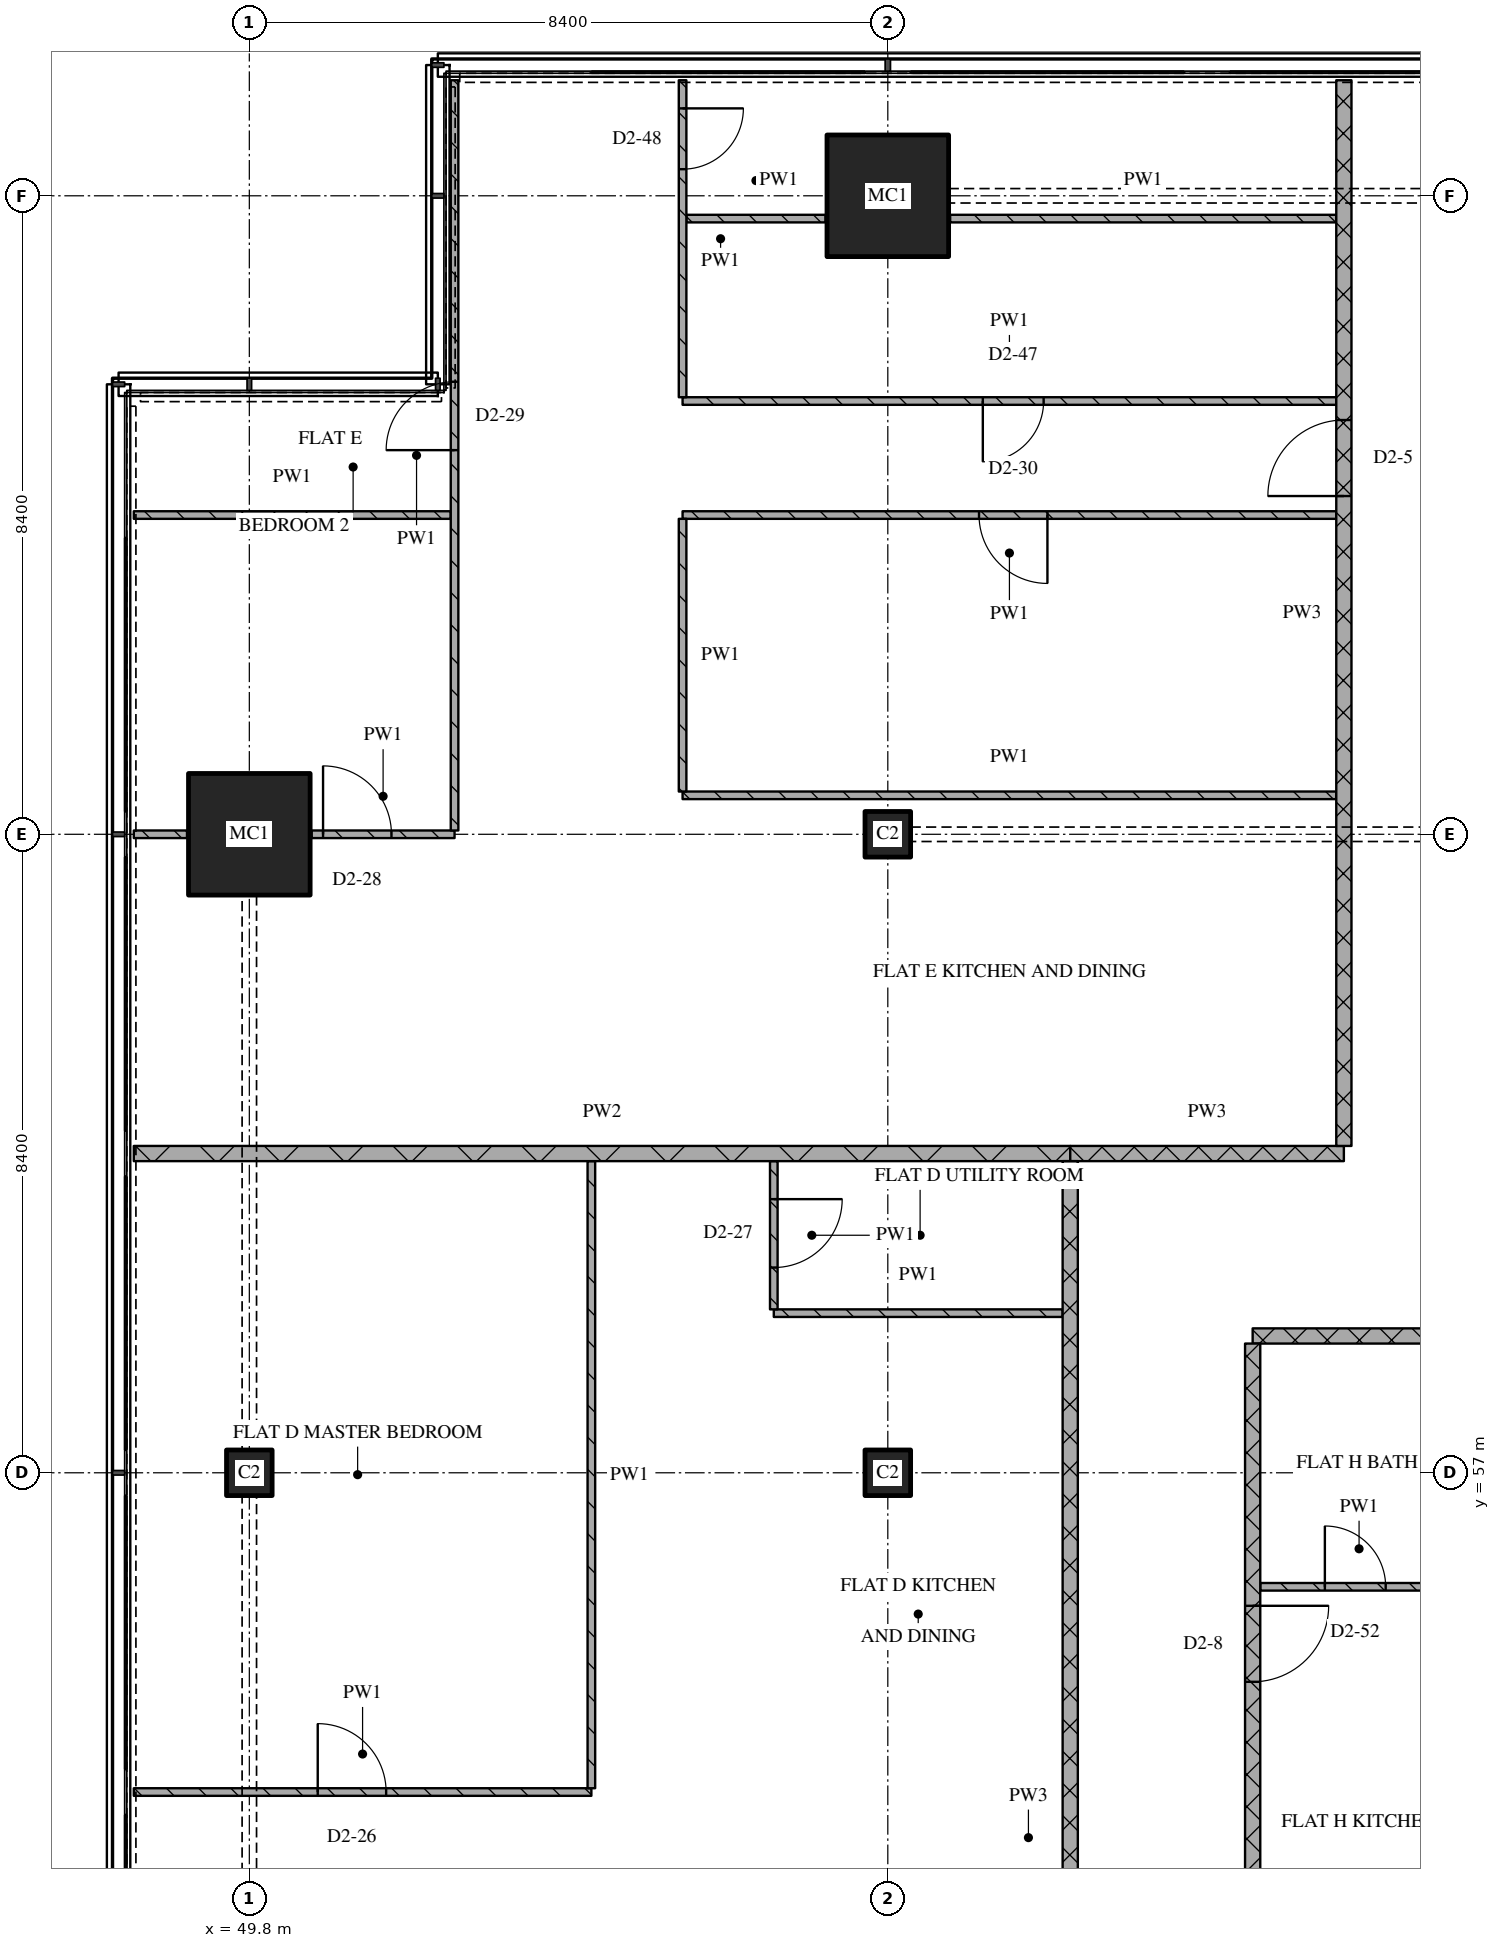
"""IFC4 building model, lengths in metres.
Left out: names, types, materials, properties, quantities, classifications, styles, units other than length and angle.
Written with IfcOpenShell. Run it as: python <this file> out.ifc"""

import sys

from ifc_helpers import new_model, si_unit, direction, frame, frame_2d, origin, origin_2d, place, context, subcontext, project, spatial, rectangle, extrude, element, fill, save


model = new_model("IFC4")
c1 = context("Model", 3, precision=1e-05, world=origin(), true_north=direction((0.0, 1.0)))
c2 = subcontext(c1, "Body", "Model", "MODEL_VIEW")
j1 = project(units=[si_unit("LENGTHUNIT", "METRE"), si_unit("PLANEANGLEUNIT", "RADIAN")], contexts=[c1])
p1 = place(None, origin())
s1 = spatial("IfcSite", under=j1, at=p1, CompositionType="ELEMENT")
p2 = place(p1, origin())
s2 = spatial("IfcBuilding", under=s1, at=p2, CompositionType="ELEMENT")
p3 = place(p2, frame((0.0, 0.0, 219.9)))
s3 = spatial("IfcBuildingStorey", under=s2, at=p3, CompositionType="ELEMENT", Elevation=219.9)
p4 = place(p3, frame((49.8, 57.0, 0.0), z_axis=(0.0, 0.0, 1.0), x_axis=(1.0, 0.0, 0.0)))
e1 = element("IfcColumn", 1, at=p4, inside=s3, PredefinedType="COLUMN", context=c2, shape_type="SweptSolid", body=[
    extrude(rectangle(XDim=0.6, YDim=0.6, at=origin_2d()), origin(), (0.0, 0.0, 1.0), 3.6),
])
p5 = place(p3, frame((49.8, 65.4, 0.0), z_axis=(0.0, 0.0, 1.0), x_axis=(1.0, 0.0, 0.0)))
e2 = element("IfcColumn", 2, at=p5, inside=s3, PredefinedType="COLUMN", context=c2, shape_type="SweptSolid", body=[
    extrude(rectangle(XDim=1.6, YDim=1.6, at=origin_2d()), origin(), (0.0, 0.0, 1.0), 3.6),
])
for number, where, z_axis, x_axis in (
    (3, (58.2, 57.0, 0.0), (0.0, 0.0, 1.0), (1.0, 0.0, 0.0)),
    (4, (58.2, 65.4, 0.0), (0.0, 0.0, 1.0), (1.0, 0.0, 0.0)),
):
    element("IfcColumn", number, at=place(p3, frame(where, z_axis=z_axis, x_axis=x_axis)), inside=s3, PredefinedType="COLUMN", context=c2, shape_type="SweptSolid", body=[
        extrude(rectangle(XDim=0.6, YDim=0.6, at=origin_2d()), origin(), (0.0, 0.0, 1.0), 3.6),
    ])
p6 = place(p3, frame((58.2, 73.8, 0.0), z_axis=(0.0, 0.0, 1.0), x_axis=(1.0, 0.0, 0.0)))
e5 = element("IfcColumn", 5, at=p6, inside=s3, PredefinedType="COLUMN", context=c2, shape_type="SweptSolid", body=[
    extrude(rectangle(XDim=1.6, YDim=1.6, at=origin_2d()), origin(), (0.0, 0.0, 1.0), 3.6),
])
p7 = place(p3, frame((48.28, 52.8, 0.0), z_axis=(0.0, 0.0, 1.0), x_axis=(1.0, 0.0, 0.0)))
e6 = element("IfcWall", 6, at=p7, inside=s3, PredefinedType="PARTITIONING", context=c2, shape_type="SweptSolid", body=[
    extrude(rectangle(XDim=6.02, YDim=0.1, at=frame_2d((3.01, 0.0))), origin(), (0.0, 0.0, 1.0), 3.32),
])
p8 = place(p7, frame((2.42, 0.0, 0.0)))
e7 = element("IfcOpeningElement", 7, at=p8, cuts=e6, PredefinedType="OPENING", context=c2, shape_type="SweptSolid", body=[
    extrude(rectangle(XDim=0.9, YDim=2.1, at=frame_2d((0.45, 1.05))), frame((0.0, 0.06, 0.0), z_axis=(0.0, -1.0, 0.0), x_axis=(1.0, 0.0, 0.0)), (0.0, 0.0, 1.0), 0.12),
])
p9 = place(p3, frame((63.1, 55.5, 0.0), z_axis=(0.0, 0.0, 1.0), x_axis=(1.0, 0.0, 0.0)))
e8 = element("IfcWall", 8, at=p9, inside=s3, PredefinedType="PARTITIONING", context=c2, shape_type="SweptSolid", body=[
    extrude(rectangle(XDim=2.6, YDim=0.1, at=frame_2d((1.3, 0.0))), origin(), (0.0, 0.0, 1.0), 3.32),
])
p10 = place(p9, frame((0.85, 0.0, 0.0)))
e9 = element("IfcOpeningElement", 9, at=p10, cuts=e8, PredefinedType="OPENING", context=c2, shape_type="SweptSolid", body=[
    extrude(rectangle(XDim=0.8, YDim=2.1, at=frame_2d((0.4, 1.05))), frame((0.0, 0.06, 0.0), z_axis=(0.0, -1.0, 0.0), x_axis=(1.0, 0.0, 0.0)), (0.0, 0.0, 1.0), 0.12),
])
p11 = place(p3, frame((63.0, 58.8, 0.0), z_axis=(0.0, 0.0, 1.0), x_axis=(1.0, 0.0, 0.0)))
e10 = element("IfcWall", 10, at=p11, inside=s3, PredefinedType="PARTITIONING", context=c2, shape_type="SweptSolid", body=[
    extrude(rectangle(XDim=10.8, YDim=0.2, at=frame_2d((5.4, 0.0))), origin(), (0.0, 0.0, 1.0), 3.32),
])
p12 = place(p3, frame((56.7, 59.1, 0.0), z_axis=(0.0, 0.0, 1.0), x_axis=(1.0, 0.0, 0.0)))
e11 = element("IfcWall", 11, at=p12, inside=s3, PredefinedType="PARTITIONING", context=c2, shape_type="SweptSolid", body=[
    extrude(rectangle(XDim=3.8, YDim=0.1, at=frame_2d((1.9, 0.0))), origin(), (0.0, 0.0, 1.0), 3.32),
])
p13 = place(p3, frame((60.6, 61.2, 0.0), z_axis=(0.0, 0.0, 1.0), x_axis=(1.0, 0.0, 0.0)))
e12 = element("IfcWall", 12, at=p13, inside=s3, PredefinedType="PARTITIONING", context=c2, shape_type="SweptSolid", body=[
    extrude(rectangle(XDim=3.6, YDim=0.2, at=frame_2d((1.8, 0.0))), origin(), (0.0, 0.0, 1.0), 3.32),
])
p14 = place(p3, frame((48.28, 61.2, 0.0), z_axis=(0.0, 0.0, 1.0), x_axis=(1.0, 0.0, 0.0)))
e13 = element("IfcWall", 13, at=p14, inside=s3, PredefinedType="PARTITIONING", context=c2, shape_type="SweptSolid", body=[
    extrude(rectangle(XDim=12.32, YDim=0.2, at=frame_2d((6.16, 0.0))), origin(), (0.0, 0.0, 1.0), 3.32),
])
p15 = place(p3, frame((48.28, 65.4, 0.0), z_axis=(0.0, 0.0, 1.0), x_axis=(1.0, 0.0, 0.0)))
e14 = element("IfcWall", 14, at=p15, inside=s3, PredefinedType="PARTITIONING", context=c2, shape_type="SweptSolid", body=[
    extrude(rectangle(XDim=0.7, YDim=0.1, at=frame_2d((0.35, 0.0))), origin(), (0.0, 0.0, 1.0), 3.32),
])
p16 = place(p3, frame((50.62, 65.4, 0.0), z_axis=(0.0, 0.0, 1.0), x_axis=(1.0, 0.0, 0.0)))
e15 = element("IfcWall", 15, at=p16, inside=s3, PredefinedType="PARTITIONING", context=c2, shape_type="SweptSolid", body=[
    extrude(rectangle(XDim=1.88, YDim=0.1, at=frame_2d((0.94, 0.0))), origin(), (0.0, 0.0, 1.0), 3.32),
])
p17 = place(p16, frame((0.15, 0.0, 0.0)))
e16 = element("IfcOpeningElement", 16, at=p17, cuts=e15, PredefinedType="OPENING", context=c2, shape_type="SweptSolid", body=[
    extrude(rectangle(XDim=0.9, YDim=2.1, at=frame_2d((0.45, 1.05))), frame((0.0, 0.06, 0.0), z_axis=(0.0, -1.0, 0.0), x_axis=(1.0, 0.0, 0.0)), (0.0, 0.0, 1.0), 0.12),
])
p18 = place(p3, frame((55.5, 65.913, 0.0), z_axis=(0.0, 0.0, 1.0), x_axis=(1.0, 0.0, 0.0)))
e17 = element("IfcWall", 17, at=p18, inside=s3, PredefinedType="PARTITIONING", context=c2, shape_type="SweptSolid", body=[
    extrude(rectangle(XDim=8.6, YDim=0.1, at=frame_2d((4.3, 0.0))), origin(), (0.0, 0.0, 1.0), 3.32),
])
p19 = place(p3, frame((48.28, 69.6, 0.0), z_axis=(0.0, 0.0, 1.0), x_axis=(1.0, 0.0, 0.0)))
e18 = element("IfcWall", 18, at=p19, inside=s3, PredefinedType="PARTITIONING", context=c2, shape_type="SweptSolid", body=[
    extrude(rectangle(XDim=4.17, YDim=0.1, at=frame_2d((2.085, 0.0))), origin(), (0.0, 0.0, 1.0), 3.32),
])
p20 = place(p3, frame((64.1, 69.6, 0.0), z_axis=(0.0, 0.0, 1.0), x_axis=(-1.0, 0.0, 0.0)))
e19 = element("IfcWall", 19, at=p20, inside=s3, PredefinedType="PARTITIONING", context=c2, shape_type="SweptSolid", body=[
    extrude(rectangle(XDim=8.6, YDim=0.1, at=frame_2d((4.3, 0.0))), origin(), (0.0, 0.0, 1.0), 3.32),
])
p21 = place(p20, frame((3.8, 0.0, 0.0)))
e20 = element("IfcOpeningElement", 20, at=p21, cuts=e19, PredefinedType="OPENING", context=c2, shape_type="SweptSolid", body=[
    extrude(rectangle(XDim=0.9, YDim=2.1, at=frame_2d((0.45, 1.05))), frame((0.0, 0.06, 0.0), z_axis=(0.0, -1.0, 0.0), x_axis=(1.0, 0.0, 0.0)), (0.0, 0.0, 1.0), 0.12),
])
p22 = place(p3, frame((55.5, 71.1, 0.0), z_axis=(0.0, 0.0, 1.0), x_axis=(1.0, 0.0, 0.0)))
e21 = element("IfcWall", 21, at=p22, inside=s3, PredefinedType="PARTITIONING", context=c2, shape_type="SweptSolid", body=[
    extrude(rectangle(XDim=8.6, YDim=0.1, at=frame_2d((4.3, 0.0))), origin(), (0.0, 0.0, 1.0), 3.32),
])
p23 = place(p22, frame((3.95, 0.0, 0.0)))
e22 = element("IfcOpeningElement", 22, at=p23, cuts=e21, PredefinedType="OPENING", context=c2, shape_type="SweptSolid", body=[
    extrude(rectangle(XDim=0.8, YDim=2.1, at=frame_2d((0.4, 1.05))), frame((0.0, 0.06, 0.0), z_axis=(0.0, -1.0, 0.0), x_axis=(1.0, 0.0, 0.0)), (0.0, 0.0, 1.0), 0.12),
])
p24 = place(p3, frame((55.55, 73.5, 0.0), z_axis=(0.0, 0.0, 1.0), x_axis=(1.0, 0.0, 0.0)))
e23 = element("IfcWall", 23, at=p24, inside=s3, PredefinedType="PARTITIONING", context=c2, shape_type="SweptSolid", body=[
    extrude(rectangle(XDim=1.83, YDim=0.1, at=frame_2d((0.915, 0.0))), origin(), (0.0, 0.0, 1.0), 3.32),
])
p25 = place(p3, frame((59.02, 73.5, 0.0), z_axis=(0.0, 0.0, 1.0), x_axis=(1.0, 0.0, 0.0)))
e24 = element("IfcWall", 24, at=p25, inside=s3, PredefinedType="PARTITIONING", context=c2, shape_type="SweptSolid", body=[
    extrude(rectangle(XDim=5.08, YDim=0.1, at=frame_2d((2.54, 0.0))), origin(), (0.0, 0.0, 1.0), 3.32),
])
p26 = place(p3, frame((52.5, 65.45, 0.0), z_axis=(0.0, 0.0, 1.0), x_axis=(0.0, 1.0, 0.0)))
e25 = element("IfcWall", 25, at=p26, inside=s3, PredefinedType="PARTITIONING", context=c2, shape_type="SweptSolid", body=[
    extrude(rectangle(XDim=9.87, YDim=0.1, at=frame_2d((4.935, 0.0))), origin(), (0.0, 0.0, 1.0), 3.32),
])
p27 = place(p26, frame((5.004, 0.0, 0.0)))
e26 = element("IfcOpeningElement", 26, at=p27, cuts=e25, PredefinedType="OPENING", context=c2, shape_type="SweptSolid", body=[
    extrude(rectangle(XDim=0.9, YDim=2.1, at=frame_2d((0.45, 1.05))), frame((0.0, 0.06, 0.0), z_axis=(0.0, -1.0, 0.0), x_axis=(1.0, 0.0, 0.0)), (0.0, 0.0, 1.0), 0.12),
])
p28 = place(p3, frame((54.3, 61.1, 0.0), z_axis=(0.0, 0.0, 1.0), x_axis=(0.0, -1.0, 0.0)))
e27 = element("IfcWall", 27, at=p28, inside=s3, PredefinedType="PARTITIONING", context=c2, shape_type="SweptSolid", body=[
    extrude(rectangle(XDim=8.25, YDim=0.1, at=frame_2d((4.125, 0.0))), origin(), (0.0, 0.0, 1.0), 3.32),
])
p29 = place(p3, frame((55.5, 69.55, 0.0), z_axis=(0.0, 0.0, 1.0), x_axis=(0.0, -1.0, 0.0)))
e28 = element("IfcWall", 28, at=p29, inside=s3, PredefinedType="PARTITIONING", context=c2, shape_type="SweptSolid", body=[
    extrude(rectangle(XDim=3.587, YDim=0.1, at=frame_2d((1.794, 0.0))), origin(), (0.0, 0.0, 1.0), 3.32),
])
p30 = place(p3, frame((55.5, 75.32, 0.0), z_axis=(0.0, 0.0, 1.0), x_axis=(0.0, -1.0, 0.0)))
e29 = element("IfcWall", 29, at=p30, inside=s3, PredefinedType="PARTITIONING", context=c2, shape_type="SweptSolid", body=[
    extrude(rectangle(XDim=4.17, YDim=0.1, at=frame_2d((2.085, 0.0))), origin(), (0.0, 0.0, 1.0), 3.32),
])
p31 = place(p30, frame((0.37, 0.0, 0.0)))
e30 = element("IfcOpeningElement", 30, at=p31, cuts=e29, PredefinedType="OPENING", context=c2, shape_type="SweptSolid", body=[
    extrude(rectangle(XDim=0.8, YDim=2.1, at=frame_2d((0.4, 1.05))), frame((0.0, 0.06, 0.0), z_axis=(0.0, -1.0, 0.0), x_axis=(1.0, 0.0, 0.0)), (0.0, 0.0, 1.0), 0.12),
])
p32 = place(p3, frame((56.7, 61.1, 0.0), z_axis=(0.0, 0.0, 1.0), x_axis=(0.0, -1.0, 0.0)))
e31 = element("IfcWall", 31, at=p32, inside=s3, PredefinedType="PARTITIONING", context=c2, shape_type="SweptSolid", body=[
    extrude(rectangle(XDim=1.95, YDim=0.1, at=frame_2d((0.975, 0.0))), origin(), (0.0, 0.0, 1.0), 3.32),
])
p33 = place(p32, frame((0.5, 0.0, 0.0)))
e32 = element("IfcOpeningElement", 32, at=p33, cuts=e31, PredefinedType="OPENING", context=c2, shape_type="SweptSolid", body=[
    extrude(rectangle(XDim=0.9, YDim=2.1, at=frame_2d((0.45, 1.05))), frame((0.0, 0.06, 0.0), z_axis=(0.0, -1.0, 0.0), x_axis=(1.0, 0.0, 0.0)), (0.0, 0.0, 1.0), 0.12),
])
p34 = place(p3, frame((60.6, 43.3, 0.0), z_axis=(0.0, 0.0, 1.0), x_axis=(0.0, 1.0, 0.0)))
e33 = element("IfcWall", 33, at=p34, inside=s3, PredefinedType="PARTITIONING", context=c2, shape_type="SweptSolid", body=[
    extrude(rectangle(XDim=17.8, YDim=0.2, at=frame_2d((8.9, 0.0))), origin(), (0.0, 0.0, 1.0), 3.32),
])
p35 = place(p34, frame((7.05, 0.0, 0.0)))
e34 = element("IfcOpeningElement", 34, at=p35, cuts=e33, PredefinedType="OPENING", context=c2, shape_type="SweptSolid", body=[
    extrude(rectangle(XDim=1.0, YDim=2.1, at=frame_2d((0.5, 1.05))), frame((0.0, 0.11, 0.0), z_axis=(0.0, -1.0, 0.0), x_axis=(1.0, 0.0, 0.0)), (0.0, 0.0, 1.0), 0.22),
])
p36 = place(p3, frame((63.0, 58.7, 0.0), z_axis=(0.0, 0.0, 1.0), x_axis=(0.0, -1.0, 0.0)))
e35 = element("IfcWall", 35, at=p36, inside=s3, PredefinedType="PARTITIONING", context=c2, shape_type="SweptSolid", body=[
    extrude(rectangle(XDim=15.4, YDim=0.2, at=frame_2d((7.7, 0.0))), origin(), (0.0, 0.0, 1.0), 3.32),
])
p37 = place(p36, frame((3.45, 0.0, 0.0)))
e36 = element("IfcOpeningElement", 36, at=p37, cuts=e35, PredefinedType="OPENING", context=c2, shape_type="SweptSolid", body=[
    extrude(rectangle(XDim=1.0, YDim=2.1, at=frame_2d((0.5, 1.05))), frame((0.0, 0.11, 0.0), z_axis=(0.0, -1.0, 0.0), x_axis=(1.0, 0.0, 0.0)), (0.0, 0.0, 1.0), 0.22),
])
p38 = place(p36, frame((11.25, 0.0, 0.0)))
e37 = element("IfcOpeningElement", 37, at=p38, cuts=e35, PredefinedType="OPENING", context=c2, shape_type="SweptSolid", body=[
    extrude(rectangle(XDim=0.9, YDim=2.1, at=frame_2d((0.45, 1.05))), frame((0.0, 0.11, 0.0), z_axis=(0.0, -1.0, 0.0), x_axis=(1.0, 0.0, 0.0)), (0.0, 0.0, 1.0), 0.22),
])
p39 = place(p3, frame((64.2, 61.3, 0.0), z_axis=(0.0, 0.0, 1.0), x_axis=(0.0, 1.0, 0.0)))
e38 = element("IfcWall", 38, at=p39, inside=s3, PredefinedType="PARTITIONING", context=c2, shape_type="SweptSolid", body=[
    extrude(rectangle(XDim=14.02, YDim=0.2, at=frame_2d((7.01, 0.0))), origin(), (0.0, 0.0, 1.0), 3.32),
])
p40 = place(p39, frame((8.55, 0.0, 0.0)))
e39 = element("IfcOpeningElement", 39, at=p40, cuts=e38, PredefinedType="OPENING", context=c2, shape_type="SweptSolid", body=[
    extrude(rectangle(XDim=1.0, YDim=2.1, at=frame_2d((0.5, 1.05))), frame((0.0, 0.11, 0.0), z_axis=(0.0, -1.0, 0.0), x_axis=(1.0, 0.0, 0.0)), (0.0, 0.0, 1.0), 0.22),
])
p41 = place(p8, origin())
e40 = element("IfcDoor", 40, at=p41, inside=s3, OperationType="SINGLE_SWING_LEFT", PredefinedType="DOOR", context=c2, shape_type="SweptSolid", body=[
    extrude(rectangle(XDim=0.9, YDim=2.1, at=frame_2d((0.45, 1.05))), frame((0.0, 0.025, 0.0), z_axis=(0.0, -1.0, 0.0), x_axis=(1.0, 0.0, 0.0)), (0.0, 0.0, 1.0), 0.05),
])
fill(e7, e40)
p42 = place(p10, origin())
e41 = element("IfcDoor", 41, at=p42, inside=s3, OperationType="SINGLE_SWING_LEFT", PredefinedType="DOOR", context=c2, shape_type="SweptSolid", body=[
    extrude(rectangle(XDim=0.8, YDim=2.1, at=frame_2d((0.4, 1.05))), frame((0.0, 0.025, 0.0), z_axis=(0.0, -1.0, 0.0), x_axis=(1.0, 0.0, 0.0)), (0.0, 0.0, 1.0), 0.05),
])
fill(e9, e41)
p43 = place(p17, origin())
e42 = element("IfcDoor", 42, at=p43, inside=s3, OperationType="SINGLE_SWING_LEFT", PredefinedType="DOOR", context=c2, shape_type="SweptSolid", body=[
    extrude(rectangle(XDim=0.9, YDim=2.1, at=frame_2d((0.45, 1.05))), frame((0.0, 0.025, 0.0), z_axis=(0.0, -1.0, 0.0), x_axis=(1.0, 0.0, 0.0)), (0.0, 0.0, 1.0), 0.05),
])
fill(e16, e42)
p44 = place(p21, origin())
e43 = element("IfcDoor", 43, at=p44, inside=s3, OperationType="SINGLE_SWING_LEFT", PredefinedType="DOOR", context=c2, shape_type="SweptSolid", body=[
    extrude(rectangle(XDim=0.9, YDim=2.1, at=frame_2d((0.45, 1.05))), frame((0.0, 0.025, 0.0), z_axis=(0.0, -1.0, 0.0), x_axis=(1.0, 0.0, 0.0)), (0.0, 0.0, 1.0), 0.05),
])
fill(e20, e43)
p45 = place(p23, origin())
e44 = element("IfcDoor", 44, at=p45, inside=s3, OperationType="SINGLE_SWING_RIGHT", PredefinedType="DOOR", context=c2, shape_type="SweptSolid", body=[
    extrude(rectangle(XDim=0.8, YDim=2.1, at=frame_2d((0.4, 1.05))), frame((0.0, 0.025, 0.0), z_axis=(0.0, -1.0, 0.0), x_axis=(1.0, 0.0, 0.0)), (0.0, 0.0, 1.0), 0.05),
])
fill(e22, e44)
p46 = place(p27, origin())
e45 = element("IfcDoor", 45, at=p46, inside=s3, OperationType="SINGLE_SWING_LEFT", PredefinedType="DOOR", context=c2, shape_type="SweptSolid", body=[
    extrude(rectangle(XDim=0.9, YDim=2.1, at=frame_2d((0.45, 1.05))), frame((0.0, 0.025, 0.0), z_axis=(0.0, -1.0, 0.0), x_axis=(1.0, 0.0, 0.0)), (0.0, 0.0, 1.0), 0.05),
])
fill(e26, e45)
p47 = place(p31, origin())
e46 = element("IfcDoor", 46, at=p47, inside=s3, OperationType="SINGLE_SWING_LEFT", PredefinedType="DOOR", context=c2, shape_type="SweptSolid", body=[
    extrude(rectangle(XDim=0.8, YDim=2.1, at=frame_2d((0.4, 1.05))), frame((0.0, 0.025, 0.0), z_axis=(0.0, -1.0, 0.0), x_axis=(1.0, 0.0, 0.0)), (0.0, 0.0, 1.0), 0.05),
])
fill(e30, e46)
p48 = place(p33, origin())
e47 = element("IfcDoor", 47, at=p48, inside=s3, OperationType="SINGLE_SWING_LEFT", PredefinedType="DOOR", context=c2, shape_type="SweptSolid", body=[
    extrude(rectangle(XDim=0.9, YDim=2.1, at=frame_2d((0.45, 1.05))), frame((0.0, 0.025, 0.0), z_axis=(0.0, -1.0, 0.0), x_axis=(1.0, 0.0, 0.0)), (0.0, 0.0, 1.0), 0.05),
])
fill(e32, e47)
p49 = place(p37, origin())
e48 = element("IfcDoor", 48, at=p49, inside=s3, OperationType="SINGLE_SWING_LEFT", PredefinedType="DOOR", context=c2, shape_type="SweptSolid", body=[
    extrude(rectangle(XDim=1.0, YDim=2.1, at=frame_2d((0.5, 1.05))), frame((0.0, 0.025, 0.0), z_axis=(0.0, -1.0, 0.0), x_axis=(1.0, 0.0, 0.0)), (0.0, 0.0, 1.0), 0.05),
])
fill(e36, e48)
p50 = place(p40, origin())
e49 = element("IfcDoor", 49, at=p50, inside=s3, OperationType="SINGLE_SWING_LEFT", PredefinedType="DOOR", context=c2, shape_type="SweptSolid", body=[
    extrude(rectangle(XDim=1.0, YDim=2.1, at=frame_2d((0.5, 1.05))), frame((0.0, 0.025, 0.0), z_axis=(0.0, -1.0, 0.0), x_axis=(1.0, 0.0, 0.0)), (0.0, 0.0, 1.0), 0.05),
])
fill(e39, e49)
save(model, sys.argv[1])
